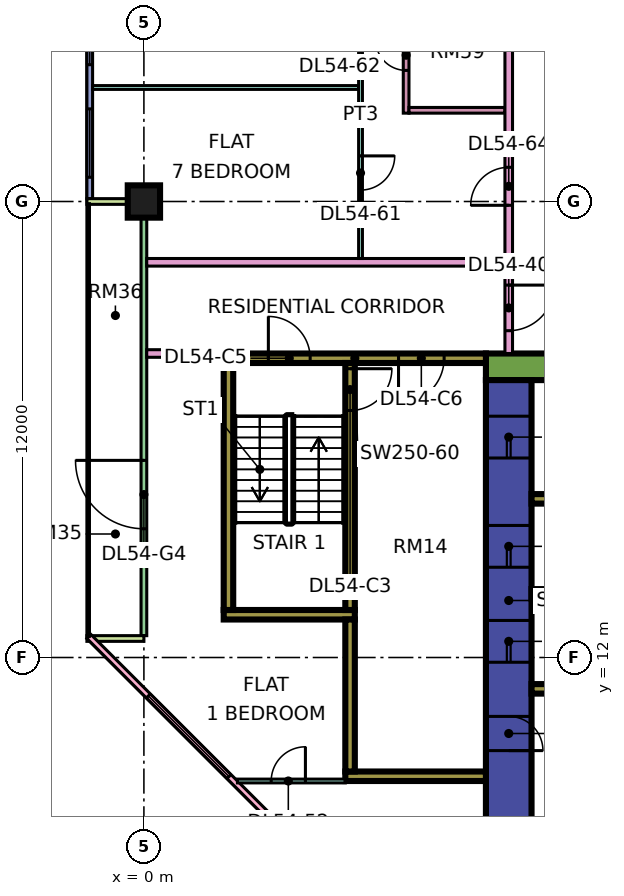
"""IFC4 building model, lengths in metres.
Left out: names, types, materials, properties, quantities, classifications, styles, units other than length and angle.
Written with IfcOpenShell. Run it as: python <this file> out.ifc"""

import sys

from ifc_helpers import new_model, si_unit, direction, frame, frame_2d, origin, origin_2d, place, context, subcontext, project, spatial, rectangle, extrude, element, fill, save


model = new_model("IFC4")
c1 = context("Model", 3, precision=1e-05, world=origin(), true_north=direction((0.0, 1.0)))
c2 = subcontext(c1, "Body", "Model", "MODEL_VIEW")
j1 = project(units=[si_unit("LENGTHUNIT", "METRE"), si_unit("PLANEANGLEUNIT", "RADIAN")], contexts=[c1])
p1 = place(None, origin())
s1 = spatial("IfcSite", under=j1, at=p1, CompositionType="ELEMENT")
p2 = place(p1, origin())
s2 = spatial("IfcBuilding", under=s1, at=p2, CompositionType="ELEMENT")
p3 = place(p2, frame((0.0, 0.0, 230.4)))
s3 = spatial("IfcBuildingStorey", under=s2, at=p3, CompositionType="ELEMENT", Elevation=230.4)
p4 = place(p3, frame((0.0, 24.0, 0.0), z_axis=(0.0, 0.0, 1.0), x_axis=(1.0, 0.0, 0.0)))
e1 = element("IfcColumn", 1, at=p4, inside=s3, PredefinedType="COLUMN", context=c2, shape_type="SweptSolid", body=[
    extrude(rectangle(XDim=0.85, YDim=0.85, at=origin_2d()), origin(), (0.0, 0.0, 1.0), 3.75),
])
p5 = place(p3, frame((9.0, 19.65, 0.0), z_axis=(0.0, 0.0, 1.0), x_axis=(1.0, 0.0, 0.0)))
e2 = element("IfcWall", 2, at=p5, inside=s3, PredefinedType="SHEAR", context=c2, shape_type="SweptSolid", body=[
    extrude(rectangle(XDim=25.0, YDim=0.7, at=frame_2d((12.5, 0.0))), origin(), (0.0, 0.0, 1.0), 3.75),
])
p6 = place(p5, frame((19.1, 0.0, 0.0)))
e3 = element("IfcOpeningElement", 3, at=p6, cuts=e2, PredefinedType="OPENING", context=c2, shape_type="SweptSolid", body=[
    extrude(rectangle(XDim=1.8, YDim=2.4, at=frame_2d((0.9, 1.2))), frame((0.0, 0.36, 0.0), z_axis=(0.0, -1.0, 0.0), x_axis=(1.0, 0.0, 0.0)), (0.0, 0.0, 1.0), 0.72),
])
p7 = place(p3, frame((9.6, 7.7, 0.0), z_axis=(0.0, 0.0, 1.0), x_axis=(0.0, 1.0, 0.0)))
e4 = element("IfcWall", 4, at=p7, inside=s3, PredefinedType="SHEAR", context=c2, shape_type="SweptSolid", body=[
    extrude(rectangle(XDim=11.6, YDim=1.2, at=frame_2d((5.8, 0.0))), origin(), (0.0, 0.0, 1.0), 3.75),
])
p8 = place(p7, frame((4.175, 0.0, 0.0)))
e5 = element("IfcOpeningElement", 5, at=p8, cuts=e4, PredefinedType="OPENING", context=c2, shape_type="SweptSolid", body=[
    extrude(rectangle(XDim=1.1, YDim=2.2, at=frame_2d((0.55, 1.1))), frame((0.0, 0.61, 0.0), z_axis=(0.0, -1.0, 0.0), x_axis=(1.0, 0.0, 0.0)), (0.0, 0.0, 1.0), 1.22),
])
p9 = place(p7, frame((6.675, 0.0, 0.0)))
e6 = element("IfcOpeningElement", 6, at=p9, cuts=e4, PredefinedType="OPENING", context=c2, shape_type="SweptSolid", body=[
    extrude(rectangle(XDim=1.1, YDim=2.2, at=frame_2d((0.55, 1.1))), frame((0.0, 0.61, 0.0), z_axis=(0.0, -1.0, 0.0), x_axis=(1.0, 0.0, 0.0)), (0.0, 0.0, 1.0), 1.22),
])
p10 = place(p7, frame((9.55, 0.0, 0.0)))
e7 = element("IfcOpeningElement", 7, at=p10, cuts=e4, PredefinedType="OPENING", context=c2, shape_type="SweptSolid", body=[
    extrude(rectangle(XDim=1.1, YDim=2.2, at=frame_2d((0.55, 1.1))), frame((0.0, 0.61, 0.0), z_axis=(0.0, -1.0, 0.0), x_axis=(1.0, 0.0, 0.0)), (0.0, 0.0, 1.0), 1.22),
])
p11 = place(p7, frame((1.85, 0.0, 0.0)))
e8 = element("IfcOpeningElement", 8, at=p11, cuts=e4, PredefinedType="OPENING", context=c2, shape_type="SweptSolid", body=[
    extrude(rectangle(XDim=0.9, YDim=2.1, at=frame_2d((0.45, 1.05))), frame((0.0, 0.61, 0.0), z_axis=(0.0, -1.0, 0.0), x_axis=(1.0, 0.0, 0.0)), (0.0, 0.0, 1.0), 1.22),
])
for number, where, z_axis, x_axis in (
    (9, (10.2, 11.175, 0.0), (0.0, 0.0, 1.0), (1.0, 0.0, 0.0)),
    (10, (10.2, 13.675, 0.0), (0.0, 0.0, 1.0), (1.0, 0.0, 0.0)),
    (11, (10.2, 16.175, 0.0), (0.0, 0.0, 1.0), (1.0, 0.0, 0.0)),
):
    element("IfcWall", number, at=place(p3, frame(where, z_axis=z_axis, x_axis=x_axis)), inside=s3, PredefinedType="SHEAR", context=c2, shape_type="SweptSolid", body=[
        extrude(rectangle(XDim=3.0, YDim=0.25, at=frame_2d((1.5, 0.0))), origin(), (0.0, 0.0, 1.0), 3.75),
    ])
p12 = place(p3, frame((2.1, 19.875, 0.0), z_axis=(0.0, 0.0, 1.0), x_axis=(1.0, 0.0, 0.0)))
e12 = element("IfcWall", 12, at=p12, inside=s3, PredefinedType="SHEAR", context=c2, shape_type="SweptSolid", body=[
    extrude(rectangle(XDim=6.9, YDim=0.25, at=frame_2d((3.45, 0.0))), origin(), (0.0, 0.0, 1.0), 3.75),
])
p13 = place(p12, frame((1.175, 0.0, 0.0)))
e13 = element("IfcOpeningElement", 13, at=p13, cuts=e12, PredefinedType="OPENING", context=c2, shape_type="SweptSolid", body=[
    extrude(rectangle(XDim=1.1, YDim=2.2, at=frame_2d((0.55, 1.1))), frame((0.0, 0.135, 0.0), z_axis=(0.0, -1.0, 0.0), x_axis=(1.0, 0.0, 0.0)), (0.0, 0.0, 1.0), 0.27),
])
p14 = place(p12, frame((4.6, 0.0, 0.0)))
e14 = element("IfcOpeningElement", 14, at=p14, cuts=e12, PredefinedType="OPENING", context=c2, shape_type="SweptSolid", body=[
    extrude(rectangle(XDim=1.2, YDim=2.2, at=frame_2d((0.6, 1.1))), frame((0.0, 0.135, 0.0), z_axis=(0.0, -1.0, 0.0), x_axis=(1.0, 0.0, 0.0)), (0.0, 0.0, 1.0), 0.27),
])
p15 = place(p3, frame((2.1, 13.125, 0.0), z_axis=(0.0, 0.0, 1.0), x_axis=(1.0, 0.0, 0.0)))
e15 = element("IfcWall", 15, at=p15, inside=s3, PredefinedType="SHEAR", context=c2, shape_type="SweptSolid", body=[
    extrude(rectangle(XDim=3.45, YDim=0.25, at=frame_2d((1.725, 0.0))), origin(), (0.0, 0.0, 1.0), 3.75),
])
p16 = place(p3, frame((2.225, 13.25, 0.0), z_axis=(0.0, 0.0, 1.0), x_axis=(0.0, 1.0, 0.0)))
e16 = element("IfcWall", 16, at=p16, inside=s3, PredefinedType="SHEAR", context=c2, shape_type="SweptSolid", body=[
    extrude(rectangle(XDim=6.5, YDim=0.25, at=frame_2d((3.25, 0.0))), origin(), (0.0, 0.0, 1.0), 3.75),
])
p17 = place(p3, frame((5.425, 13.25, 0.0), z_axis=(0.0, 0.0, 1.0), x_axis=(0.0, 1.0, 0.0)))
e17 = element("IfcWall", 17, at=p17, inside=s3, PredefinedType="SHEAR", context=c2, shape_type="SweptSolid", body=[
    extrude(rectangle(XDim=6.5, YDim=0.25, at=frame_2d((3.25, 0.0))), origin(), (0.0, 0.0, 1.0), 3.75),
])
p18 = place(p17, frame((5.25, 0.0, 0.0)))
e18 = element("IfcOpeningElement", 18, at=p18, cuts=e17, PredefinedType="OPENING", context=c2, shape_type="SweptSolid", body=[
    extrude(rectangle(XDim=1.1, YDim=2.2, at=frame_2d((0.55, 1.1))), frame((0.0, 0.135, 0.0), z_axis=(0.0, -1.0, 0.0), x_axis=(1.0, 0.0, 0.0)), (0.0, 0.0, 1.0), 0.27),
])
p19 = place(p3, frame((5.3, 8.875, 0.0), z_axis=(0.0, 0.0, 1.0), x_axis=(1.0, 0.0, 0.0)))
e19 = element("IfcWall", 19, at=p19, inside=s3, PredefinedType="SHEAR", context=c2, shape_type="SweptSolid", body=[
    extrude(rectangle(XDim=3.7, YDim=0.25, at=frame_2d((1.85, 0.0))), origin(), (0.0, 0.0, 1.0), 3.75),
])
p20 = place(p3, frame((5.425, 9.0, 0.0), z_axis=(0.0, 0.0, 1.0), x_axis=(0.0, 1.0, 0.0)))
e20 = element("IfcWall", 20, at=p20, inside=s3, PredefinedType="SHEAR", context=c2, shape_type="SweptSolid", body=[
    extrude(rectangle(XDim=4.0, YDim=0.25, at=frame_2d((2.0, 0.0))), origin(), (0.0, 0.0, 1.0), 3.75),
])
p21 = place(p3, frame((-1.425, 35.925, 0.0), z_axis=(0.0, 0.0, 1.0), x_axis=(0.0, -1.0, 0.0)))
e21 = element("IfcWall", 21, at=p21, inside=s3, PredefinedType="SOLIDWALL", context=c2, shape_type="SweptSolid", body=[
    extrude(rectangle(XDim=11.85, YDim=0.15, at=frame_2d((5.925, 0.0))), origin(), (0.0, 0.0, 1.0), 3.35),
])
p22 = place(p21, frame((1.462, 0.0, 0.45)))
e22 = element("IfcOpeningElement", 22, at=p22, cuts=e21, PredefinedType="OPENING", context=c2, shape_type="SweptSolid", body=[
    extrude(rectangle(XDim=3.0, YDim=2.4, at=frame_2d((1.5, 1.2))), frame((0.0, 0.085, 0.0), z_axis=(0.0, -1.0, 0.0), x_axis=(1.0, 0.0, 0.0)), (0.0, 0.0, 1.0), 0.17),
])
p23 = place(p21, frame((6.525, 0.0, 0.45)))
e23 = element("IfcOpeningElement", 23, at=p23, cuts=e21, PredefinedType="OPENING", context=c2, shape_type="SweptSolid", body=[
    extrude(rectangle(XDim=1.8, YDim=2.4, at=frame_2d((0.9, 1.2))), frame((0.0, 0.085, 0.0), z_axis=(0.0, -1.0, 0.0), x_axis=(1.0, 0.0, 0.0)), (0.0, 0.0, 1.0), 0.17),
])
p24 = place(p21, frame((9.488, 0.0, 0.45)))
e24 = element("IfcOpeningElement", 24, at=p24, cuts=e21, PredefinedType="OPENING", context=c2, shape_type="SweptSolid", body=[
    extrude(rectangle(XDim=1.8, YDim=2.4, at=frame_2d((0.9, 1.2))), frame((0.0, 0.085, 0.0), z_axis=(0.0, -1.0, 0.0), x_axis=(1.0, 0.0, 0.0)), (0.0, 0.0, 1.0), 0.17),
])
p25 = place(p3, frame((0.0, 23.925, 0.0), z_axis=(0.0, 0.0, 1.0), x_axis=(0.0, -1.0, 0.0)))
e25 = element("IfcWall", 25, at=p25, inside=s3, PredefinedType="SOLIDWALL", context=c2, shape_type="SweptSolid", body=[
    extrude(rectangle(XDim=11.35, YDim=0.15, at=frame_2d((5.675, 0.0))), origin(), (0.0, 0.0, 1.0), 3.35),
])
p26 = place(p25, frame((6.738, 0.0, 0.0)))
e26 = element("IfcOpeningElement", 26, at=p26, cuts=e25, PredefinedType="OPENING", context=c2, shape_type="SweptSolid", body=[
    extrude(rectangle(XDim=1.8, YDim=2.4, at=frame_2d((0.9, 1.2))), frame((0.0, 0.085, 0.0), z_axis=(0.0, -1.0, 0.0), x_axis=(1.0, 0.0, 0.0)), (0.0, 0.0, 1.0), 0.17),
])
for number, where, z_axis, x_axis in (
    (27, (-1.5, 24.0, 0.0), (0.0, 0.0, 1.0), (1.0, 0.0, 0.0)),
    (28, (-1.5, 12.5, 0.0), (0.0, 0.0, 1.0), (1.0, 0.0, 0.0)),
):
    element("IfcWall", number, at=place(p3, frame(where, z_axis=z_axis, x_axis=x_axis)), inside=s3, PredefinedType="SOLIDWALL", context=c2, shape_type="SweptSolid", body=[
        extrude(rectangle(XDim=1.5, YDim=0.15, at=frame_2d((0.75, 0.0))), origin(), (0.0, 0.0, 1.0), 3.35),
    ])
p27 = place(p3, frame((-1.447, 12.553, 0.0), z_axis=(0.0, 0.0, 1.0), x_axis=(0.707106781187, -0.707106781187, 0.0)))
e29 = element("IfcWall", 29, at=p27, inside=s3, PredefinedType="SOLIDWALL", context=c2, shape_type="SweptSolid", body=[
    extrude(rectangle(XDim=19.799, YDim=0.15, at=frame_2d((9.899, 0.0))), origin(), (0.0, 0.0, 1.0), 3.35),
])
p28 = place(p27, frame((2.212, 0.0, 0.45)))
e30 = element("IfcOpeningElement", 30, at=p28, cuts=e29, PredefinedType="OPENING", context=c2, shape_type="SweptSolid", body=[
    extrude(rectangle(XDim=3.0, YDim=2.4, at=frame_2d((1.5, 1.2))), frame((0.0, 0.085, 0.0), z_axis=(0.0, -1.0, 0.0), x_axis=(1.0, 0.0, 0.0)), (0.0, 0.0, 1.0), 0.17),
])
p29 = place(p27, frame((10.216, 0.0, 0.45)))
e31 = element("IfcOpeningElement", 31, at=p29, cuts=e29, PredefinedType="OPENING", context=c2, shape_type="SweptSolid", body=[
    extrude(rectangle(XDim=3.0, YDim=2.4, at=frame_2d((1.5, 1.2))), frame((0.0, 0.085, 0.0), z_axis=(0.0, -1.0, 0.0), x_axis=(1.0, 0.0, 0.0)), (0.0, 0.0, 1.0), 0.17),
])
p30 = place(p3, frame((-1.351, 27.0, 0.0), z_axis=(0.0, 0.0, 1.0), x_axis=(1.0, 0.0, 0.0)))
e32 = element("IfcWall", 32, at=p30, inside=s3, PredefinedType="PARTITIONING", context=c2, shape_type="SweptSolid", body=[
    extrude(rectangle(XDim=7.001, YDim=0.1, at=frame_2d((3.5, 0.0))), origin(), (0.0, 0.0, 1.0), 3.35),
])
p31 = place(p3, frame((0.074, 20.0, 0.0), z_axis=(0.0, 0.0, 1.0), x_axis=(1.0, 0.0, 0.0)))
e33 = element("IfcWall", 33, at=p31, inside=s3, PredefinedType="PARTITIONING", context=c2, shape_type="SweptSolid", body=[
    extrude(rectangle(XDim=2.026, YDim=0.2, at=frame_2d((1.013, 0.0))), origin(), (0.0, 0.0, 1.0), 3.35),
])
p32 = place(p3, frame((0.074, 22.4, 0.0), z_axis=(0.0, 0.0, 1.0), x_axis=(1.0, 0.0, 0.0)))
e34 = element("IfcWall", 34, at=p32, inside=s3, PredefinedType="PARTITIONING", context=c2, shape_type="SweptSolid", body=[
    extrude(rectangle(XDim=9.426, YDim=0.2, at=frame_2d((4.713, 0.0))), origin(), (0.0, 0.0, 1.0), 3.35),
])
p33 = place(p3, frame((2.461, 8.75, 0.0), z_axis=(0.0, 0.0, 1.0), x_axis=(1.0, 0.0, 0.0)))
e35 = element("IfcWall", 35, at=p33, inside=s3, PredefinedType="PARTITIONING", context=c2, shape_type="SweptSolid", body=[
    extrude(rectangle(XDim=2.839, YDim=0.1, at=frame_2d((1.419, 0.0))), origin(), (0.0, 0.0, 1.0), 3.35),
])
p34 = place(p33, frame((0.889, 0.0, 0.0)))
e36 = element("IfcOpeningElement", 36, at=p34, cuts=e35, PredefinedType="OPENING", context=c2, shape_type="SweptSolid", body=[
    extrude(rectangle(XDim=0.9, YDim=2.1, at=frame_2d((0.45, 1.05))), frame((0.0, 0.06, 0.0), z_axis=(0.0, -1.0, 0.0), x_axis=(1.0, 0.0, 0.0)), (0.0, 0.0, 1.0), 0.12),
])
p35 = place(p3, frame((5.7, 22.5, 0.0), z_axis=(0.0, 0.0, 1.0), x_axis=(0.0, 1.0, 0.0)))
e37 = element("IfcWall", 37, at=p35, inside=s3, PredefinedType="PARTITIONING", context=c2, shape_type="SweptSolid", body=[
    extrude(rectangle(XDim=7.55, YDim=0.1, at=frame_2d((3.775, 0.0))), origin(), (0.0, 0.0, 1.0), 3.35),
])
p36 = place(p35, frame((1.8, 0.0, 0.0)))
e38 = element("IfcOpeningElement", 38, at=p36, cuts=e37, PredefinedType="OPENING", context=c2, shape_type="SweptSolid", body=[
    extrude(rectangle(XDim=0.9, YDim=2.1, at=frame_2d((0.45, 1.05))), frame((0.0, 0.06, 0.0), z_axis=(0.0, -1.0, 0.0), x_axis=(1.0, 0.0, 0.0)), (0.0, 0.0, 1.0), 0.12),
])
p37 = place(p35, frame((5.55, 0.0, 0.0)))
e39 = element("IfcOpeningElement", 39, at=p37, cuts=e37, PredefinedType="OPENING", context=c2, shape_type="SweptSolid", body=[
    extrude(rectangle(XDim=0.9, YDim=2.1, at=frame_2d((0.45, 1.05))), frame((0.0, 0.06, 0.0), z_axis=(0.0, -1.0, 0.0), x_axis=(1.0, 0.0, 0.0)), (0.0, 0.0, 1.0), 0.12),
])
p38 = place(p3, frame((6.9, 26.325, 0.0), z_axis=(0.0, 0.0, 1.0), x_axis=(0.0, 1.0, 0.0)))
e40 = element("IfcWall", 40, at=p38, inside=s3, PredefinedType="PARTITIONING", context=c2, shape_type="SweptSolid", body=[
    extrude(rectangle(XDim=9.575, YDim=0.15, at=frame_2d((4.788, 0.0))), origin(), (0.0, 0.0, 1.0), 3.35),
])
p39 = place(p38, frame((1.125, 0.0, 0.0)))
e41 = element("IfcOpeningElement", 41, at=p39, cuts=e40, PredefinedType="OPENING", context=c2, shape_type="SweptSolid", body=[
    extrude(rectangle(XDim=0.8, YDim=2.1, at=frame_2d((0.4, 1.05))), frame((0.0, 0.085, 0.0), z_axis=(0.0, -1.0, 0.0), x_axis=(1.0, 0.0, 0.0)), (0.0, 0.0, 1.0), 0.17),
])
p40 = place(p38, frame((5.925, 0.0, 0.0)))
e42 = element("IfcOpeningElement", 42, at=p40, cuts=e40, PredefinedType="OPENING", context=c2, shape_type="SweptSolid", body=[
    extrude(rectangle(XDim=0.9, YDim=2.1, at=frame_2d((0.45, 1.05))), frame((0.0, 0.085, 0.0), z_axis=(0.0, -1.0, 0.0), x_axis=(1.0, 0.0, 0.0)), (0.0, 0.0, 1.0), 0.17),
])
p41 = place(p3, frame((6.975, 26.4, 0.0), z_axis=(0.0, 0.0, 1.0), x_axis=(1.0, 0.0, 0.0)))
e43 = element("IfcWall", 43, at=p41, inside=s3, PredefinedType="PARTITIONING", context=c2, shape_type="SweptSolid", body=[
    extrude(rectangle(XDim=2.525, YDim=0.15, at=frame_2d((1.262, 0.0))), origin(), (0.0, 0.0, 1.0), 3.35),
])
p42 = place(p3, frame((9.6, 20.0, 0.0), z_axis=(0.0, 0.0, 1.0), x_axis=(0.0, 1.0, 0.0)))
e44 = element("IfcWall", 44, at=p42, inside=s3, PredefinedType="PARTITIONING", context=c2, shape_type="SweptSolid", body=[
    extrude(rectangle(XDim=44.35, YDim=0.2, at=frame_2d((22.175, 0.0))), origin(), (0.0, 0.0, 1.0), 3.35),
])
p43 = place(p42, frame((17.1, 0.0, 0.0)))
e45 = element("IfcOpeningElement", 45, at=p43, cuts=e44, PredefinedType="OPENING", context=c2, shape_type="SweptSolid", body=[
    extrude(rectangle(XDim=1.0, YDim=2.1, at=frame_2d((0.5, 1.05))), frame((0.0, 0.11, 0.0), z_axis=(0.0, -1.0, 0.0), x_axis=(1.0, 0.0, 0.0)), (0.0, 0.0, 1.0), 0.22),
])
p44 = place(p42, frame((0.6, 0.0, 0.0)))
e46 = element("IfcOpeningElement", 46, at=p44, cuts=e44, PredefinedType="OPENING", context=c2, shape_type="SweptSolid", body=[
    extrude(rectangle(XDim=1.2, YDim=2.1, at=frame_2d((0.6, 1.05))), frame((0.0, 0.11, 0.0), z_axis=(0.0, -1.0, 0.0), x_axis=(1.0, 0.0, 0.0)), (0.0, 0.0, 1.0), 0.22),
])
p45 = place(p42, frame((3.9, 0.0, 0.0)))
e47 = element("IfcOpeningElement", 47, at=p45, cuts=e44, PredefinedType="OPENING", context=c2, shape_type="SweptSolid", body=[
    extrude(rectangle(XDim=1.0, YDim=2.1, at=frame_2d((0.5, 1.05))), frame((0.0, 0.11, 0.0), z_axis=(0.0, -1.0, 0.0), x_axis=(1.0, 0.0, 0.0)), (0.0, 0.0, 1.0), 0.22),
])
p46 = place(p23, origin())
e48 = element("IfcWindow", 48, at=p46, inside=s3, PartitioningType="SINGLE_PANEL", PredefinedType="WINDOW", context=c2, shape_type="SweptSolid", body=[
    extrude(rectangle(XDim=1.8, YDim=2.4, at=frame_2d((0.9, 1.2))), frame((0.0, 0.03, 0.0), z_axis=(0.0, -1.0, 0.0), x_axis=(1.0, 0.0, 0.0)), (0.0, 0.0, 1.0), 0.06),
])
fill(e23, e48)
p47 = place(p24, origin())
e49 = element("IfcWindow", 49, at=p47, inside=s3, PartitioningType="SINGLE_PANEL", PredefinedType="WINDOW", context=c2, shape_type="SweptSolid", body=[
    extrude(rectangle(XDim=1.8, YDim=2.4, at=frame_2d((0.9, 1.2))), frame((0.0, 0.03, 0.0), z_axis=(0.0, -1.0, 0.0), x_axis=(1.0, 0.0, 0.0)), (0.0, 0.0, 1.0), 0.06),
])
fill(e24, e49)
p48 = place(p26, frame((1.8, 0.0, 0.0), z_axis=(0.0, 0.0, 1.0), x_axis=(-1.0, 0.0, 0.0)))
e50 = element("IfcDoor", 50, at=p48, inside=s3, OperationType="DOUBLE_DOOR_SINGLE_SWING", PredefinedType="DOOR", context=c2, shape_type="SweptSolid", body=[
    extrude(rectangle(XDim=1.8, YDim=2.4, at=frame_2d((0.9, 1.2))), frame((0.0, 0.025, 0.0), z_axis=(0.0, -1.0, 0.0), x_axis=(1.0, 0.0, 0.0)), (0.0, 0.0, 1.0), 0.05),
])
fill(e26, e50)
p49 = place(p28, origin())
e51 = element("IfcWindow", 51, at=p49, inside=s3, PartitioningType="SINGLE_PANEL", PredefinedType="WINDOW", context=c2, shape_type="SweptSolid", body=[
    extrude(rectangle(XDim=3.0, YDim=2.4, at=frame_2d((1.5, 1.2))), frame((0.0, 0.03, 0.0), z_axis=(0.0, -1.0, 0.0), x_axis=(1.0, 0.0, 0.0)), (0.0, 0.0, 1.0), 0.06),
])
fill(e30, e51)
p50 = place(p8, origin())
e52 = element("IfcDoor", 52, at=p50, inside=s3, OperationType="DOUBLE_DOOR_SLIDING", PredefinedType="DOOR", context=c2, shape_type="SweptSolid", body=[
    extrude(rectangle(XDim=1.1, YDim=2.2, at=frame_2d((0.55, 1.1))), frame((0.0, 0.025, 0.0), z_axis=(0.0, -1.0, 0.0), x_axis=(1.0, 0.0, 0.0)), (0.0, 0.0, 1.0), 0.05),
])
fill(e5, e52)
p51 = place(p9, origin())
e53 = element("IfcDoor", 53, at=p51, inside=s3, OperationType="DOUBLE_DOOR_SLIDING", PredefinedType="DOOR", context=c2, shape_type="SweptSolid", body=[
    extrude(rectangle(XDim=1.1, YDim=2.2, at=frame_2d((0.55, 1.1))), frame((0.0, 0.025, 0.0), z_axis=(0.0, -1.0, 0.0), x_axis=(1.0, 0.0, 0.0)), (0.0, 0.0, 1.0), 0.05),
])
fill(e6, e53)
p52 = place(p10, origin())
e54 = element("IfcDoor", 54, at=p52, inside=s3, OperationType="DOUBLE_DOOR_SLIDING", PredefinedType="DOOR", context=c2, shape_type="SweptSolid", body=[
    extrude(rectangle(XDim=1.1, YDim=2.2, at=frame_2d((0.55, 1.1))), frame((0.0, 0.025, 0.0), z_axis=(0.0, -1.0, 0.0), x_axis=(1.0, 0.0, 0.0)), (0.0, 0.0, 1.0), 0.05),
])
fill(e7, e54)
p53 = place(p18, origin())
e55 = element("IfcDoor", 55, at=p53, inside=s3, OperationType="SINGLE_SWING_RIGHT", PredefinedType="DOOR", context=c2, shape_type="SweptSolid", body=[
    extrude(rectangle(XDim=1.1, YDim=2.2, at=frame_2d((0.55, 1.1))), frame((0.0, 0.025, 0.0), z_axis=(0.0, -1.0, 0.0), x_axis=(1.0, 0.0, 0.0)), (0.0, 0.0, 1.0), 0.05),
])
fill(e18, e55)
p54 = place(p11, frame((0.9, 0.0, 0.0), z_axis=(0.0, 0.0, 1.0), x_axis=(-1.0, 0.0, 0.0)))
e56 = element("IfcDoor", 56, at=p54, inside=s3, OperationType="SINGLE_SWING_LEFT", PredefinedType="DOOR", context=c2, shape_type="SweptSolid", body=[
    extrude(rectangle(XDim=0.9, YDim=2.1, at=frame_2d((0.45, 1.05))), frame((0.0, 0.025, 0.0), z_axis=(0.0, -1.0, 0.0), x_axis=(1.0, 0.0, 0.0)), (0.0, 0.0, 1.0), 0.05),
])
fill(e8, e56)
p55 = place(p13, origin())
e57 = element("IfcDoor", 57, at=p55, inside=s3, OperationType="SINGLE_SWING_LEFT", PredefinedType="DOOR", context=c2, shape_type="SweptSolid", body=[
    extrude(rectangle(XDim=1.1, YDim=2.2, at=frame_2d((0.55, 1.1))), frame((0.0, 0.025, 0.0), z_axis=(0.0, -1.0, 0.0), x_axis=(1.0, 0.0, 0.0)), (0.0, 0.0, 1.0), 0.05),
])
fill(e13, e57)
p56 = place(p14, frame((1.2, 0.0, 0.0), z_axis=(0.0, 0.0, 1.0), x_axis=(-1.0, 0.0, 0.0)))
e58 = element("IfcDoor", 58, at=p56, inside=s3, OperationType="SINGLE_SWING_LEFT", PredefinedType="DOOR", context=c2, shape_type="SweptSolid", body=[
    extrude(rectangle(XDim=1.2, YDim=2.2, at=frame_2d((0.6, 1.1))), frame((0.0, 0.025, 0.0), z_axis=(0.0, -1.0, 0.0), x_axis=(1.0, 0.0, 0.0)), (0.0, 0.0, 1.0), 0.05),
])
fill(e14, e58)
p57 = place(p44, origin())
e59 = element("IfcDoor", 59, at=p57, inside=s3, OperationType="SINGLE_SWING_RIGHT", PredefinedType="DOOR", context=c2, shape_type="SweptSolid", body=[
    extrude(rectangle(XDim=1.2, YDim=2.1, at=frame_2d((0.6, 1.05))), frame((0.0, 0.025, 0.0), z_axis=(0.0, -1.0, 0.0), x_axis=(1.0, 0.0, 0.0)), (0.0, 0.0, 1.0), 0.05),
])
fill(e46, e59)
p58 = place(p34, frame((0.9, 0.0, 0.0), z_axis=(0.0, 0.0, 1.0), x_axis=(-1.0, 0.0, 0.0)))
e60 = element("IfcDoor", 60, at=p58, inside=s3, OperationType="SINGLE_SWING_RIGHT", PredefinedType="DOOR", context=c2, shape_type="SweptSolid", body=[
    extrude(rectangle(XDim=0.9, YDim=2.1, at=frame_2d((0.45, 1.05))), frame((0.0, 0.025, 0.0), z_axis=(0.0, -1.0, 0.0), x_axis=(1.0, 0.0, 0.0)), (0.0, 0.0, 1.0), 0.05),
])
fill(e36, e60)
p59 = place(p39, frame((0.8, 0.0, 0.0), z_axis=(0.0, 0.0, 1.0), x_axis=(-1.0, 0.0, 0.0)))
e61 = element("IfcDoor", 61, at=p59, inside=s3, OperationType="SINGLE_SWING_RIGHT", PredefinedType="DOOR", context=c2, shape_type="SweptSolid", body=[
    extrude(rectangle(XDim=0.8, YDim=2.1, at=frame_2d((0.4, 1.05))), frame((0.0, 0.025, 0.0), z_axis=(0.0, -1.0, 0.0), x_axis=(1.0, 0.0, 0.0)), (0.0, 0.0, 1.0), 0.05),
])
fill(e41, e61)
p60 = place(p36, origin())
e62 = element("IfcDoor", 62, at=p60, inside=s3, OperationType="SINGLE_SWING_RIGHT", PredefinedType="DOOR", context=c2, shape_type="SweptSolid", body=[
    extrude(rectangle(XDim=0.9, YDim=2.1, at=frame_2d((0.45, 1.05))), frame((0.0, 0.025, 0.0), z_axis=(0.0, -1.0, 0.0), x_axis=(1.0, 0.0, 0.0)), (0.0, 0.0, 1.0), 0.05),
])
fill(e38, e62)
p61 = place(p45, origin())
e63 = element("IfcDoor", 63, at=p61, inside=s3, OperationType="SINGLE_SWING_LEFT", PredefinedType="DOOR", context=c2, shape_type="SweptSolid", body=[
    extrude(rectangle(XDim=1.0, YDim=2.1, at=frame_2d((0.5, 1.05))), frame((0.0, 0.025, 0.0), z_axis=(0.0, -1.0, 0.0), x_axis=(1.0, 0.0, 0.0)), (0.0, 0.0, 1.0), 0.05),
])
fill(e47, e63)
save(model, sys.argv[1])
